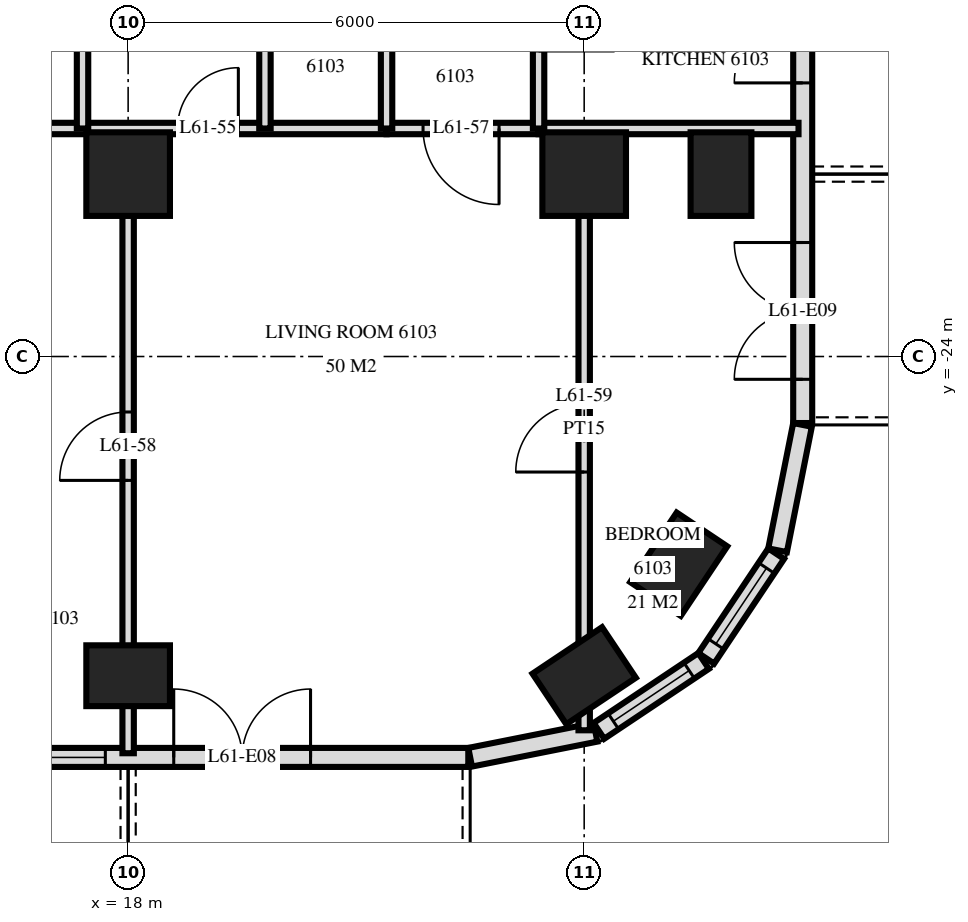
"""IFC4 building model, lengths in metres.
Left out: names, types, materials, properties, quantities, classifications, styles, units other than length and angle.
Written with IfcOpenShell. Run it as: python <this file> out.ifc"""

import sys

from ifc_helpers import new_model, si_unit, direction, frame, frame_2d, origin, origin_2d, place, context, subcontext, project, spatial, rectangle, extrude, element, fill, save


model = new_model("IFC4")
c1 = context("Model", 3, precision=1e-05, world=origin(), true_north=direction((0.0, 1.0)))
c2 = subcontext(c1, "Body", "Model", "MODEL_VIEW")
j1 = project(units=[si_unit("LENGTHUNIT", "METRE"), si_unit("PLANEANGLEUNIT", "RADIAN")], contexts=[c1])
p1 = place(None, origin())
s1 = spatial("IfcSite", under=j1, at=p1, CompositionType="ELEMENT")
p2 = place(p1, origin())
s2 = spatial("IfcBuilding", under=s1, at=p2, CompositionType="ELEMENT")
p3 = place(p2, frame((0.0, 0.0, 232.6)))
s3 = spatial("IfcBuildingStorey", under=s2, at=p3, CompositionType="ELEMENT", Elevation=232.6)
p4 = place(p3, frame((18.0, -28.2, 0.0), z_axis=(0.0, 0.0, 1.0), x_axis=(1.0, 0.0, 0.0)))
e1 = element("IfcColumn", 1, at=p4, inside=s3, PredefinedType="COLUMN", context=c2, shape_type="SweptSolid", body=[
    extrude(rectangle(XDim=1.1, YDim=0.8, at=origin_2d()), origin(), (0.0, 0.0, 1.0), 3.5),
])
p5 = place(p3, frame((18.0, -21.6, 0.0), z_axis=(0.0, 0.0, 1.0), x_axis=(1.0, 0.0, 0.0)))
e2 = element("IfcColumn", 2, at=p5, inside=s3, PredefinedType="COLUMN", context=c2, shape_type="SweptSolid", body=[
    extrude(rectangle(XDim=1.1, YDim=1.1, at=origin_2d()), origin(), (0.0, 0.0, 1.0), 3.5),
])
p6 = place(p3, frame((24.0, -28.2, 0.0), z_axis=(0.0, 0.0, 1.0), x_axis=(0.831459915646, 0.555584744817, 0.0)))
e3 = element("IfcColumn", 3, at=p6, inside=s3, PredefinedType="COLUMN", context=c2, shape_type="SweptSolid", body=[
    extrude(rectangle(XDim=1.1, YDim=0.8, at=origin_2d()), origin(), (0.0, 0.0, 1.0), 3.5),
])
p7 = place(p3, frame((24.0, -21.6, 0.0), z_axis=(0.0, 0.0, 1.0), x_axis=(1.0, 0.0, 0.0)))
e4 = element("IfcColumn", 4, at=p7, inside=s3, PredefinedType="COLUMN", context=c2, shape_type="SweptSolid", body=[
    extrude(rectangle(XDim=1.1, YDim=1.1, at=origin_2d()), origin(), (0.0, 0.0, 1.0), 3.5),
])
for number, where, z_axis, x_axis in (
    (5, (25.244, -26.733, 0.0), (0.0, 0.0, 1.0), (0.556, 0.831, 0.0)),
    (6, (25.8, -21.6, 0.0), (0.0, 0.0, 1.0), (0.0, 1.0, 0.0)),
):
    element("IfcColumn", number, at=place(p3, frame(where, z_axis=z_axis, x_axis=x_axis)), inside=s3, PredefinedType="COLUMN", context=c2, shape_type="SweptSolid", body=[
        extrude(rectangle(XDim=1.1, YDim=0.8, at=origin_2d()), origin(), (0.0, 0.0, 1.0), 3.5),
    ])
p8 = place(p3, frame((-22.475, -29.275, 0.0), z_axis=(0.0, 0.0, 1.0), x_axis=(1.0, 0.0, 0.0)))
e7 = element("IfcWall", 7, at=p8, inside=s3, PredefinedType="SOLIDWALL", context=c2, shape_type="SweptSolid", body=[
    extrude(rectangle(XDim=44.951, YDim=0.25, at=frame_2d((22.475, 0.0))), origin(), (0.0, 0.0, 1.0), 3.22),
])
p9 = place(p8, frame((0.575, 0.0, 0.0)))
e8 = element("IfcOpeningElement", 8, at=p9, cuts=e7, PredefinedType="OPENING", context=c2, shape_type="SweptSolid", body=[
    extrude(rectangle(XDim=1.8, YDim=2.4, at=frame_2d((0.9, 1.2))), frame((0.0, 0.135, 0.0), z_axis=(0.0, -1.0, 0.0), x_axis=(1.0, 0.0, 0.0)), (0.0, 0.0, 1.0), 0.27),
])
p10 = place(p8, frame((8.075, 0.0, 0.0)))
e9 = element("IfcOpeningElement", 9, at=p10, cuts=e7, PredefinedType="OPENING", context=c2, shape_type="SweptSolid", body=[
    extrude(rectangle(XDim=1.8, YDim=2.4, at=frame_2d((0.9, 1.2))), frame((0.0, 0.135, 0.0), z_axis=(0.0, -1.0, 0.0), x_axis=(1.0, 0.0, 0.0)), (0.0, 0.0, 1.0), 0.27),
])
p11 = place(p8, frame((11.075, 0.0, 0.0)))
e10 = element("IfcOpeningElement", 10, at=p11, cuts=e7, PredefinedType="OPENING", context=c2, shape_type="SweptSolid", body=[
    extrude(rectangle(XDim=1.8, YDim=2.4, at=frame_2d((0.9, 1.2))), frame((0.0, 0.135, 0.0), z_axis=(0.0, -1.0, 0.0), x_axis=(1.0, 0.0, 0.0)), (0.0, 0.0, 1.0), 0.27),
])
p12 = place(p8, frame((13.775, 0.0, 0.9)))
e11 = element("IfcOpeningElement", 11, at=p12, cuts=e7, PredefinedType="OPENING", context=c2, shape_type="SweptSolid", body=[
    extrude(rectangle(XDim=2.4, YDim=1.5, at=frame_2d((1.2, 0.75))), frame((0.0, 0.135, 0.0), z_axis=(0.0, -1.0, 0.0), x_axis=(1.0, 0.0, 0.0)), (0.0, 0.0, 1.0), 0.27),
])
p13 = place(p8, frame((16.775, 0.0, 0.9)))
e12 = element("IfcOpeningElement", 12, at=p13, cuts=e7, PredefinedType="OPENING", context=c2, shape_type="SweptSolid", body=[
    extrude(rectangle(XDim=2.4, YDim=1.5, at=frame_2d((1.2, 0.75))), frame((0.0, 0.135, 0.0), z_axis=(0.0, -1.0, 0.0), x_axis=(1.0, 0.0, 0.0)), (0.0, 0.0, 1.0), 0.27),
])
p14 = place(p8, frame((20.075, 0.0, 0.0)))
e13 = element("IfcOpeningElement", 13, at=p14, cuts=e7, PredefinedType="OPENING", context=c2, shape_type="SweptSolid", body=[
    extrude(rectangle(XDim=1.8, YDim=2.4, at=frame_2d((0.9, 1.2))), frame((0.0, 0.135, 0.0), z_axis=(0.0, -1.0, 0.0), x_axis=(1.0, 0.0, 0.0)), (0.0, 0.0, 1.0), 0.27),
])
p15 = place(p8, frame((23.075, 0.0, 0.0)))
e14 = element("IfcOpeningElement", 14, at=p15, cuts=e7, PredefinedType="OPENING", context=c2, shape_type="SweptSolid", body=[
    extrude(rectangle(XDim=1.8, YDim=2.4, at=frame_2d((0.9, 1.2))), frame((0.0, 0.135, 0.0), z_axis=(0.0, -1.0, 0.0), x_axis=(1.0, 0.0, 0.0)), (0.0, 0.0, 1.0), 0.27),
])
p16 = place(p8, frame((25.775, 0.0, 0.9)))
e15 = element("IfcOpeningElement", 15, at=p16, cuts=e7, PredefinedType="OPENING", context=c2, shape_type="SweptSolid", body=[
    extrude(rectangle(XDim=2.4, YDim=1.5, at=frame_2d((1.2, 0.75))), frame((0.0, 0.135, 0.0), z_axis=(0.0, -1.0, 0.0), x_axis=(1.0, 0.0, 0.0)), (0.0, 0.0, 1.0), 0.27),
])
p17 = place(p8, frame((29.075, 0.0, 0.0)))
e16 = element("IfcOpeningElement", 16, at=p17, cuts=e7, PredefinedType="OPENING", context=c2, shape_type="SweptSolid", body=[
    extrude(rectangle(XDim=1.8, YDim=2.4, at=frame_2d((0.9, 1.2))), frame((0.0, 0.135, 0.0), z_axis=(0.0, -1.0, 0.0), x_axis=(1.0, 0.0, 0.0)), (0.0, 0.0, 1.0), 0.27),
])
p18 = place(p8, frame((31.775, 0.0, 0.9)))
e17 = element("IfcOpeningElement", 17, at=p18, cuts=e7, PredefinedType="OPENING", context=c2, shape_type="SweptSolid", body=[
    extrude(rectangle(XDim=2.4, YDim=1.5, at=frame_2d((1.2, 0.75))), frame((0.0, 0.135, 0.0), z_axis=(0.0, -1.0, 0.0), x_axis=(1.0, 0.0, 0.0)), (0.0, 0.0, 1.0), 0.27),
])
p19 = place(p8, frame((35.075, 0.0, 0.0)))
e18 = element("IfcOpeningElement", 18, at=p19, cuts=e7, PredefinedType="OPENING", context=c2, shape_type="SweptSolid", body=[
    extrude(rectangle(XDim=1.8, YDim=2.4, at=frame_2d((0.9, 1.2))), frame((0.0, 0.135, 0.0), z_axis=(0.0, -1.0, 0.0), x_axis=(1.0, 0.0, 0.0)), (0.0, 0.0, 1.0), 0.27),
])
p20 = place(p8, frame((37.775, 0.0, 0.9)))
e19 = element("IfcOpeningElement", 19, at=p20, cuts=e7, PredefinedType="OPENING", context=c2, shape_type="SweptSolid", body=[
    extrude(rectangle(XDim=2.4, YDim=1.5, at=frame_2d((1.2, 0.75))), frame((0.0, 0.135, 0.0), z_axis=(0.0, -1.0, 0.0), x_axis=(1.0, 0.0, 0.0)), (0.0, 0.0, 1.0), 0.27),
])
p21 = place(p8, frame((41.075, 0.0, 0.0)))
e20 = element("IfcOpeningElement", 20, at=p21, cuts=e7, PredefinedType="OPENING", context=c2, shape_type="SweptSolid", body=[
    extrude(rectangle(XDim=1.8, YDim=2.4, at=frame_2d((0.9, 1.2))), frame((0.0, 0.135, 0.0), z_axis=(0.0, -1.0, 0.0), x_axis=(1.0, 0.0, 0.0)), (0.0, 0.0, 1.0), 0.27),
])
p22 = place(p3, frame((22.5, -29.273, 0.0), z_axis=(0.0, 0.0, 1.0), x_axis=(0.980775640221, 0.19513878023, 0.0)))
e21 = element("IfcWall", 21, at=p22, inside=s3, PredefinedType="SOLIDWALL", context=c2, shape_type="SweptSolid", body=[
    extrude(rectangle(XDim=1.681, YDim=0.25, at=frame_2d((0.841, 0.0))), origin(), (0.0, 0.0, 1.0), 3.22),
])
p23 = place(p3, frame((24.194, -28.926, 0.0), z_axis=(0.0, 0.0, 1.0), x_axis=(0.831482937015, 0.55555029066, 0.0)))
e22 = element("IfcWall", 22, at=p23, inside=s3, PredefinedType="SOLIDWALL", context=c2, shape_type="SweptSolid", body=[
    extrude(rectangle(XDim=1.656, YDim=0.25, at=frame_2d((0.828, 0.0))), origin(), (0.0, 0.0, 1.0), 3.22),
])
p24 = place(p23, frame((0.228, 0.0, 0.9)))
e23 = element("IfcOpeningElement", 23, at=p24, cuts=e22, PredefinedType="OPENING", context=c2, shape_type="SweptSolid", body=[
    extrude(rectangle(XDim=1.2, YDim=1.5, at=frame_2d((0.6, 0.75))), frame((0.0, 0.135, 0.0), z_axis=(0.0, -1.0, 0.0), x_axis=(1.0, 0.0, 0.0)), (0.0, 0.0, 1.0), 0.27),
])
p25 = place(p3, frame((25.606, -27.971, 0.0), z_axis=(0.0, 0.0, 1.0), x_axis=(0.55555029066, 0.831482937015, 0.0)))
e24 = element("IfcWall", 24, at=p25, inside=s3, PredefinedType="SOLIDWALL", context=c2, shape_type="SweptSolid", body=[
    extrude(rectangle(XDim=1.656, YDim=0.25, at=frame_2d((0.828, 0.0))), origin(), (0.0, 0.0, 1.0), 3.22),
])
p26 = place(p25, frame((0.228, 0.0, 0.9)))
e25 = element("IfcOpeningElement", 25, at=p26, cuts=e24, PredefinedType="OPENING", context=c2, shape_type="SweptSolid", body=[
    extrude(rectangle(XDim=1.2, YDim=1.5, at=frame_2d((0.6, 0.75))), frame((0.0, 0.135, 0.0), z_axis=(0.0, -1.0, 0.0), x_axis=(1.0, 0.0, 0.0)), (0.0, 0.0, 1.0), 0.27),
])
p27 = place(p3, frame((26.545, -26.549, 0.0), z_axis=(0.0, 0.0, 1.0), x_axis=(0.195026884138, 0.980797896849, 0.0)))
e26 = element("IfcWall", 26, at=p27, inside=s3, PredefinedType="SOLIDWALL", context=c2, shape_type="SweptSolid", body=[
    extrude(rectangle(XDim=1.681, YDim=0.25, at=frame_2d((0.841, 0.0))), origin(), (0.0, 0.0, 1.0), 3.22),
])
p28 = place(p3, frame((26.875, -24.875, 0.0), z_axis=(0.0, 0.0, 1.0), x_axis=(0.0, 1.0, 0.0)))
e27 = element("IfcWall", 27, at=p28, inside=s3, PredefinedType="SOLIDWALL", context=c2, shape_type="SweptSolid", body=[
    extrude(rectangle(XDim=21.551, YDim=0.25, at=frame_2d((10.775, 0.0))), origin(), (0.0, 0.0, 1.0), 3.22),
])
p29 = place(p28, frame((0.575, 0.0, 0.0)))
e28 = element("IfcOpeningElement", 28, at=p29, cuts=e27, PredefinedType="OPENING", context=c2, shape_type="SweptSolid", body=[
    extrude(rectangle(XDim=1.8, YDim=2.4, at=frame_2d((0.9, 1.2))), frame((0.0, 0.135, 0.0), z_axis=(0.0, -1.0, 0.0), x_axis=(1.0, 0.0, 0.0)), (0.0, 0.0, 1.0), 0.27),
])
p30 = place(p28, frame((4.475, 0.0, 0.0)))
e29 = element("IfcOpeningElement", 29, at=p30, cuts=e27, PredefinedType="OPENING", context=c2, shape_type="SweptSolid", body=[
    extrude(rectangle(XDim=1.8, YDim=2.4, at=frame_2d((0.9, 1.2))), frame((0.0, 0.135, 0.0), z_axis=(0.0, -1.0, 0.0), x_axis=(1.0, 0.0, 0.0)), (0.0, 0.0, 1.0), 0.27),
])
p31 = place(p28, frame((7.775, 0.0, 0.9)))
e30 = element("IfcOpeningElement", 30, at=p31, cuts=e27, PredefinedType="OPENING", context=c2, shape_type="SweptSolid", body=[
    extrude(rectangle(XDim=1.2, YDim=1.5, at=frame_2d((0.6, 0.75))), frame((0.0, 0.135, 0.0), z_axis=(0.0, -1.0, 0.0), x_axis=(1.0, 0.0, 0.0)), (0.0, 0.0, 1.0), 0.27),
])
p32 = place(p28, frame((13.1, 0.0, 0.0)))
e31 = element("IfcOpeningElement", 31, at=p32, cuts=e27, PredefinedType="OPENING", context=c2, shape_type="SweptSolid", body=[
    extrude(rectangle(XDim=1.8, YDim=2.4, at=frame_2d((0.9, 1.2))), frame((0.0, 0.135, 0.0), z_axis=(0.0, -1.0, 0.0), x_axis=(1.0, 0.0, 0.0)), (0.0, 0.0, 1.0), 0.27),
])
p33 = place(p3, frame((24.0, -28.918, 0.0), z_axis=(0.0, 0.0, 1.0), x_axis=(0.0, 1.0, 0.0)))
e32 = element("IfcWall", 32, at=p33, inside=s3, PredefinedType="PARTITIONING", context=c2, shape_type="SweptSolid", body=[
    extrude(rectangle(XDim=7.918, YDim=0.15, at=frame_2d((3.959, 0.0))), origin(), (0.0, 0.0, 1.0), 3.22),
])
p34 = place(p33, frame((3.398, 0.0, 0.0)))
e33 = element("IfcOpeningElement", 33, at=p34, cuts=e32, PredefinedType="OPENING", context=c2, shape_type="SweptSolid", body=[
    extrude(rectangle(XDim=0.9, YDim=2.1, at=frame_2d((0.45, 1.05))), frame((0.0, 0.085, 0.0), z_axis=(0.0, -1.0, 0.0), x_axis=(1.0, 0.0, 0.0)), (0.0, 0.0, 1.0), 0.17),
])
p35 = place(p3, frame((23.4, -21.0, 0.0), z_axis=(0.0, 0.0, 1.0), x_axis=(0.0, 1.0, 0.0)))
e34 = element("IfcWall", 34, at=p35, inside=s3, PredefinedType="PARTITIONING", context=c2, shape_type="SweptSolid", body=[
    extrude(rectangle(XDim=3.0, YDim=0.15, at=frame_2d((1.5, 0.0))), origin(), (0.0, 0.0, 1.0), 3.22),
])
p36 = place(p35, frame((1.02, 0.0, 0.0)))
e35 = element("IfcOpeningElement", 35, at=p36, cuts=e34, PredefinedType="OPENING", context=c2, shape_type="SweptSolid", body=[
    extrude(rectangle(XDim=1.0, YDim=2.1, at=frame_2d((0.5, 1.05))), frame((0.0, 0.085, 0.0), z_axis=(0.0, -1.0, 0.0), x_axis=(1.0, 0.0, 0.0)), (0.0, 0.0, 1.0), 0.17),
])
for number, where, z_axis, x_axis in (
    (36, (21.4, -21.0, 0.0), (0.0, 0.0, 1.0), (0.0, 1.0, 0.0)),
    (37, (19.8, -21.0, 0.0), (0.0, 0.0, 1.0), (0.0, 1.0, 0.0)),
):
    element("IfcWall", number, at=place(p3, frame(where, z_axis=z_axis, x_axis=x_axis)), inside=s3, PredefinedType="PARTITIONING", context=c2, shape_type="SweptSolid", body=[
        extrude(rectangle(XDim=3.0, YDim=0.15, at=frame_2d((1.5, 0.0))), origin(), (0.0, 0.0, 1.0), 3.22),
    ])
p37 = place(p3, frame((18.0, -29.22, 0.0), z_axis=(0.0, 0.0, 1.0), x_axis=(0.0, 1.0, 0.0)))
e38 = element("IfcWall", 38, at=p37, inside=s3, PredefinedType="PARTITIONING", context=c2, shape_type="SweptSolid", body=[
    extrude(rectangle(XDim=8.22, YDim=0.15, at=frame_2d((4.11, 0.0))), origin(), (0.0, 0.0, 1.0), 3.22),
])
p38 = place(p37, frame((3.59, 0.0, 0.0)))
e39 = element("IfcOpeningElement", 39, at=p38, cuts=e38, PredefinedType="OPENING", context=c2, shape_type="SweptSolid", body=[
    extrude(rectangle(XDim=0.9, YDim=2.1, at=frame_2d((0.45, 1.05))), frame((0.0, 0.085, 0.0), z_axis=(0.0, -1.0, 0.0), x_axis=(1.0, 0.0, 0.0)), (0.0, 0.0, 1.0), 0.17),
])
p39 = place(p3, frame((17.4, -21.0, 0.0), z_axis=(0.0, 0.0, 1.0), x_axis=(0.0, 1.0, 0.0)))
e40 = element("IfcWall", 40, at=p39, inside=s3, PredefinedType="PARTITIONING", context=c2, shape_type="SweptSolid", body=[
    extrude(rectangle(XDim=3.0, YDim=0.15, at=frame_2d((1.5, 0.0))), origin(), (0.0, 0.0, 1.0), 3.22),
])
p40 = place(p3, frame((21.4, -21.0, 0.0), z_axis=(0.0, 0.0, 1.0), x_axis=(1.0, 0.0, 0.0)))
e41 = element("IfcWall", 41, at=p40, inside=s3, PredefinedType="PARTITIONING", context=c2, shape_type="SweptSolid", body=[
    extrude(rectangle(XDim=2.0, YDim=0.15, at=frame_2d((1.0, 0.0))), origin(), (0.0, 0.0, 1.0), 3.22),
])
p41 = place(p40, frame((0.48, 0.0, 0.0)))
e42 = element("IfcOpeningElement", 42, at=p41, cuts=e41, PredefinedType="OPENING", context=c2, shape_type="SweptSolid", body=[
    extrude(rectangle(XDim=1.0, YDim=2.1, at=frame_2d((0.5, 1.05))), frame((0.0, 0.085, 0.0), z_axis=(0.0, -1.0, 0.0), x_axis=(1.0, 0.0, 0.0)), (0.0, 0.0, 1.0), 0.17),
])
p42 = place(p3, frame((13.3, -21.0, 0.0), z_axis=(0.0, 0.0, 1.0), x_axis=(1.0, 0.0, 0.0)))
e43 = element("IfcWall", 43, at=p42, inside=s3, PredefinedType="PARTITIONING", context=c2, shape_type="SweptSolid", body=[
    extrude(rectangle(XDim=8.1, YDim=0.15, at=frame_2d((4.05, 0.0))), origin(), (0.0, 0.0, 1.0), 3.22),
])
p43 = place(p42, frame((2.48, 0.0, 0.0)))
e44 = element("IfcOpeningElement", 44, at=p43, cuts=e43, PredefinedType="OPENING", context=c2, shape_type="SweptSolid", body=[
    extrude(rectangle(XDim=0.8, YDim=2.1, at=frame_2d((0.4, 1.05))), frame((0.0, 0.085, 0.0), z_axis=(0.0, -1.0, 0.0), x_axis=(1.0, 0.0, 0.0)), (0.0, 0.0, 1.0), 0.17),
])
p44 = place(p42, frame((5.35, 0.0, 0.0)))
e45 = element("IfcOpeningElement", 45, at=p44, cuts=e43, PredefinedType="OPENING", context=c2, shape_type="SweptSolid", body=[
    extrude(rectangle(XDim=0.8, YDim=2.1, at=frame_2d((0.4, 1.05))), frame((0.0, 0.085, 0.0), z_axis=(0.0, -1.0, 0.0), x_axis=(1.0, 0.0, 0.0)), (0.0, 0.0, 1.0), 0.17),
])
p45 = place(p3, frame((23.4, -21.0, 0.0), z_axis=(0.0, 0.0, 1.0), x_axis=(1.0, 0.0, 0.0)))
e46 = element("IfcWall", 46, at=p45, inside=s3, PredefinedType="PARTITIONING", context=c2, shape_type="SweptSolid", body=[
    extrude(rectangle(XDim=3.42, YDim=0.15, at=frame_2d((1.71, 0.0))), origin(), (0.0, 0.0, 1.0), 3.22),
])
p46 = place(p24, origin())
e47 = element("IfcWindow", 47, at=p46, inside=s3, PartitioningType="SINGLE_PANEL", PredefinedType="WINDOW", context=c2, shape_type="SweptSolid", body=[
    extrude(rectangle(XDim=1.2, YDim=1.5, at=frame_2d((0.6, 0.75))), frame((0.0, 0.03, 0.0), z_axis=(0.0, -1.0, 0.0), x_axis=(1.0, 0.0, 0.0)), (0.0, 0.0, 1.0), 0.06),
])
fill(e23, e47)
p47 = place(p26, origin())
e48 = element("IfcWindow", 48, at=p47, inside=s3, PartitioningType="SINGLE_PANEL", PredefinedType="WINDOW", context=c2, shape_type="SweptSolid", body=[
    extrude(rectangle(XDim=1.2, YDim=1.5, at=frame_2d((0.6, 0.75))), frame((0.0, 0.03, 0.0), z_axis=(0.0, -1.0, 0.0), x_axis=(1.0, 0.0, 0.0)), (0.0, 0.0, 1.0), 0.06),
])
fill(e25, e48)
p48 = place(p20, origin())
e49 = element("IfcWindow", 49, at=p48, inside=s3, PartitioningType="SINGLE_PANEL", PredefinedType="WINDOW", context=c2, shape_type="SweptSolid", body=[
    extrude(rectangle(XDim=2.4, YDim=1.5, at=frame_2d((1.2, 0.75))), frame((0.0, 0.03, 0.0), z_axis=(0.0, -1.0, 0.0), x_axis=(1.0, 0.0, 0.0)), (0.0, 0.0, 1.0), 0.06),
])
fill(e19, e49)
p49 = place(p21, origin())
e50 = element("IfcDoor", 50, at=p49, inside=s3, OperationType="DOUBLE_DOOR_SINGLE_SWING", PredefinedType="DOOR", context=c2, shape_type="SweptSolid", body=[
    extrude(rectangle(XDim=1.8, YDim=2.4, at=frame_2d((0.9, 1.2))), frame((0.0, 0.025, 0.0), z_axis=(0.0, -1.0, 0.0), x_axis=(1.0, 0.0, 0.0)), (0.0, 0.0, 1.0), 0.05),
])
fill(e20, e50)
p50 = place(p29, origin())
e51 = element("IfcDoor", 51, at=p50, inside=s3, OperationType="DOUBLE_DOOR_SINGLE_SWING", PredefinedType="DOOR", context=c2, shape_type="SweptSolid", body=[
    extrude(rectangle(XDim=1.8, YDim=2.4, at=frame_2d((0.9, 1.2))), frame((0.0, 0.025, 0.0), z_axis=(0.0, -1.0, 0.0), x_axis=(1.0, 0.0, 0.0)), (0.0, 0.0, 1.0), 0.05),
])
fill(e28, e51)
p51 = place(p30, origin())
e52 = element("IfcDoor", 52, at=p51, inside=s3, OperationType="DOUBLE_DOOR_SINGLE_SWING", PredefinedType="DOOR", context=c2, shape_type="SweptSolid", body=[
    extrude(rectangle(XDim=1.8, YDim=2.4, at=frame_2d((0.9, 1.2))), frame((0.0, 0.025, 0.0), z_axis=(0.0, -1.0, 0.0), x_axis=(1.0, 0.0, 0.0)), (0.0, 0.0, 1.0), 0.05),
])
fill(e29, e52)
p52 = place(p44, origin())
e53 = element("IfcDoor", 53, at=p52, inside=s3, OperationType="SINGLE_SWING_LEFT", PredefinedType="DOOR", context=c2, shape_type="SweptSolid", body=[
    extrude(rectangle(XDim=0.8, YDim=2.1, at=frame_2d((0.4, 1.05))), frame((0.0, 0.025, 0.0), z_axis=(0.0, -1.0, 0.0), x_axis=(1.0, 0.0, 0.0)), (0.0, 0.0, 1.0), 0.05),
])
fill(e45, e53)
p53 = place(p41, frame((0.5, 0.0, 0.0), z_axis=(0.0, 0.0, 1.0), x_axis=(-1.0, 0.0, 0.0)))
e54 = element("IfcDoor", 54, at=p53, inside=s3, OperationType="SINGLE_SWING_RIGHT", PredefinedType="DOOR", context=c2, shape_type="SweptSolid", body=[
    extrude(rectangle(XDim=1.0, YDim=2.1, at=frame_2d((0.0, 1.05))), frame((0.0, -0.025, 0.0), z_axis=(0.0, 1.0, 0.0), x_axis=(-1.0, 0.0, 0.0)), (0.0, 0.0, 1.0), 0.05),
])
fill(e42, e54)
p54 = place(p38, origin())
e55 = element("IfcDoor", 55, at=p54, inside=s3, OperationType="SINGLE_SWING_RIGHT", PredefinedType="DOOR", context=c2, shape_type="SweptSolid", body=[
    extrude(rectangle(XDim=0.9, YDim=2.1, at=frame_2d((0.45, 1.05))), frame((0.0, 0.025, 0.0), z_axis=(0.0, -1.0, 0.0), x_axis=(1.0, 0.0, 0.0)), (0.0, 0.0, 1.0), 0.05),
])
fill(e39, e55)
p55 = place(p34, origin())
e56 = element("IfcDoor", 56, at=p55, inside=s3, OperationType="SINGLE_SWING_RIGHT", PredefinedType="DOOR", context=c2, shape_type="SweptSolid", body=[
    extrude(rectangle(XDim=0.9, YDim=2.1, at=frame_2d((0.45, 1.05))), frame((0.0, 0.025, 0.0), z_axis=(0.0, -1.0, 0.0), x_axis=(1.0, 0.0, 0.0)), (0.0, 0.0, 1.0), 0.05),
])
fill(e33, e56)
save(model, sys.argv[1])
